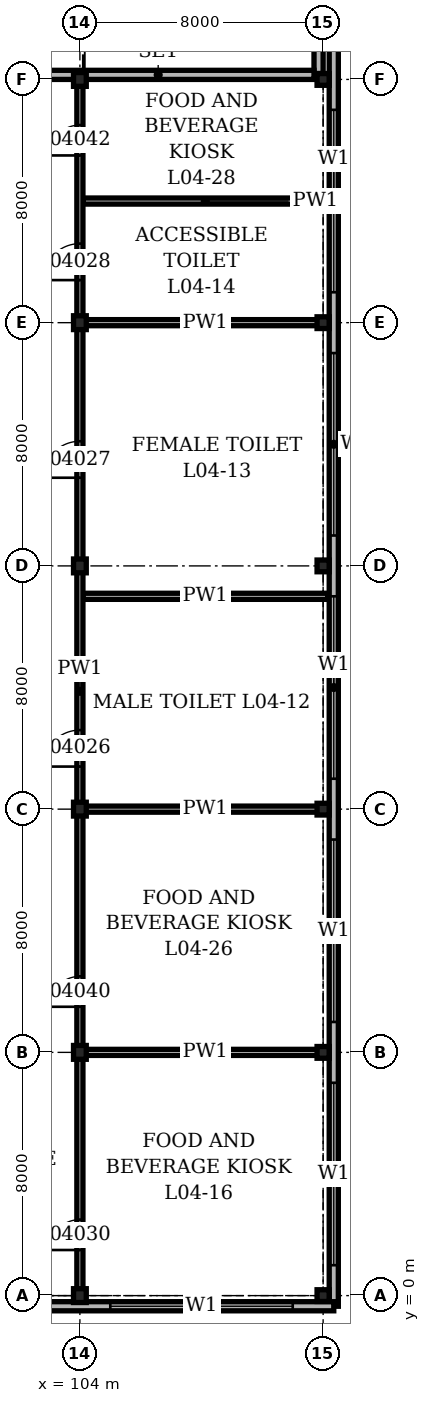
"""IFC4 building model, lengths in metres.
Left out: names, types, materials, properties, quantities, classifications, styles, units other than length and angle.
Written with IfcOpenShell. Run it as: python <this file> out.ifc"""

import sys

from ifc_helpers import new_model, si_unit, direction, frame, frame_2d, origin, origin_2d, place, context, subcontext, project, spatial, rectangle, i_section, extrude, element, fill, save


model = new_model("IFC4")
c1 = context("Model", 3, precision=1e-05, world=origin(), true_north=direction((0.0, 1.0)))
c2 = subcontext(c1, "Body", "Model", "MODEL_VIEW")
j1 = project(units=[si_unit("LENGTHUNIT", "METRE"), si_unit("PLANEANGLEUNIT", "RADIAN")], contexts=[c1])
p1 = place(None, origin())
s1 = spatial("IfcSite", under=j1, at=p1, CompositionType="ELEMENT")
p2 = place(p1, origin())
s2 = spatial("IfcBuilding", under=s1, at=p2, CompositionType="ELEMENT")
p3 = place(p2, frame((0.0, 0.0, 19.9)))
s3 = spatial("IfcBuildingStorey", under=s2, at=p3, CompositionType="ELEMENT", Elevation=19.9)
for number, where, z_axis, x_axis in (
    (1, (104.0, 0.0, 0.0), (0.0, 0.0, 1.0), (1.0, 0.0, 0.0)),
    (2, (104.0, 8.0, 0.0), (0.0, 0.0, 1.0), (1.0, 0.0, 0.0)),
    (3, (104.0, 16.0, 0.0), (0.0, 0.0, 1.0), (1.0, 0.0, 0.0)),
    (4, (104.0, 24.0, 0.0), (0.0, 0.0, 1.0), (1.0, 0.0, 0.0)),
    (5, (104.0, 32.0, 0.0), (0.0, 0.0, 1.0), (1.0, 0.0, 0.0)),
    (6, (104.0, 40.0, 0.0), (0.0, 0.0, 1.0), (1.0, 0.0, 0.0)),
):
    element("IfcColumn", number, at=place(p3, frame(where, z_axis=z_axis, x_axis=x_axis)), inside=s3, PredefinedType="COLUMN", context=c2, shape_type="SweptSolid", body=[
        extrude(i_section(OverallWidth=0.419, OverallDepth=0.455, WebThickness=0.042, FlangeThickness=0.068, at=origin_2d()), origin(), (0.0, 0.0, 1.0), 6.0),
    ])
for number, where, z_axis, x_axis in (
    (7, (112.0, 0.0, 0.0), (0.0, 0.0, 1.0), (1.0, 0.0, 0.0)),
    (8, (112.0, 8.0, 0.0), (0.0, 0.0, 1.0), (1.0, 0.0, 0.0)),
    (9, (112.0, 16.0, 0.0), (0.0, 0.0, 1.0), (1.0, 0.0, 0.0)),
    (10, (112.0, 24.0, 0.0), (0.0, 0.0, 1.0), (1.0, 0.0, 0.0)),
    (11, (112.0, 32.0, 0.0), (0.0, 0.0, 1.0), (1.0, 0.0, 0.0)),
    (12, (112.0, 40.0, 0.0), (0.0, 0.0, 1.0), (1.0, 0.0, 0.0)),
):
    element("IfcColumn", number, at=place(p3, frame(where, z_axis=z_axis, x_axis=x_axis)), inside=s3, PredefinedType="COLUMN", context=c2, shape_type="SweptSolid", body=[
        extrude(i_section(OverallWidth=0.399, OverallDepth=0.386, WebThickness=0.021, FlangeThickness=0.033, at=origin_2d()), origin(), (0.0, 0.0, 1.0), 6.0),
    ])
p4 = place(p3, frame((-0.35, -0.35, 0.0), z_axis=(0.0, 0.0, 1.0), x_axis=(1.0, 0.0, 0.0)))
e13 = element("IfcWall", 13, at=p4, inside=s3, PredefinedType="SOLIDWALL", context=c2, shape_type="SweptSolid", body=[
    extrude(rectangle(XDim=112.7, YDim=0.3, at=frame_2d((56.35, 0.0))), origin(), (0.0, 0.0, 1.0), 6.0),
])
p5 = place(p4, frame((1.35, 0.0, 1.0)))
e14 = element("IfcOpeningElement", 14, at=p5, cuts=e13, PredefinedType="OPENING", context=c2, shape_type="SweptSolid", body=[
    extrude(rectangle(XDim=6.0, YDim=1.5, at=frame_2d((3.0, 0.75))), frame((0.0, 0.16, 0.0), z_axis=(0.0, -1.0, 0.0), x_axis=(1.0, 0.0, 0.0)), (0.0, 0.0, 1.0), 0.32),
])
p6 = place(p4, frame((9.35, 0.0, 1.0)))
e15 = element("IfcOpeningElement", 15, at=p6, cuts=e13, PredefinedType="OPENING", context=c2, shape_type="SweptSolid", body=[
    extrude(rectangle(XDim=6.0, YDim=1.5, at=frame_2d((3.0, 0.75))), frame((0.0, 0.16, 0.0), z_axis=(0.0, -1.0, 0.0), x_axis=(1.0, 0.0, 0.0)), (0.0, 0.0, 1.0), 0.32),
])
p7 = place(p4, frame((17.35, 0.0, 1.0)))
e16 = element("IfcOpeningElement", 16, at=p7, cuts=e13, PredefinedType="OPENING", context=c2, shape_type="SweptSolid", body=[
    extrude(rectangle(XDim=6.0, YDim=1.5, at=frame_2d((3.0, 0.75))), frame((0.0, 0.16, 0.0), z_axis=(0.0, -1.0, 0.0), x_axis=(1.0, 0.0, 0.0)), (0.0, 0.0, 1.0), 0.32),
])
p8 = place(p4, frame((25.35, 0.0, 1.0)))
e17 = element("IfcOpeningElement", 17, at=p8, cuts=e13, PredefinedType="OPENING", context=c2, shape_type="SweptSolid", body=[
    extrude(rectangle(XDim=6.0, YDim=1.5, at=frame_2d((3.0, 0.75))), frame((0.0, 0.16, 0.0), z_axis=(0.0, -1.0, 0.0), x_axis=(1.0, 0.0, 0.0)), (0.0, 0.0, 1.0), 0.32),
])
p9 = place(p4, frame((33.35, 0.0, 1.0)))
e18 = element("IfcOpeningElement", 18, at=p9, cuts=e13, PredefinedType="OPENING", context=c2, shape_type="SweptSolid", body=[
    extrude(rectangle(XDim=6.0, YDim=1.5, at=frame_2d((3.0, 0.75))), frame((0.0, 0.16, 0.0), z_axis=(0.0, -1.0, 0.0), x_axis=(1.0, 0.0, 0.0)), (0.0, 0.0, 1.0), 0.32),
])
p10 = place(p4, frame((41.35, 0.0, 1.0)))
e19 = element("IfcOpeningElement", 19, at=p10, cuts=e13, PredefinedType="OPENING", context=c2, shape_type="SweptSolid", body=[
    extrude(rectangle(XDim=6.0, YDim=1.5, at=frame_2d((3.0, 0.75))), frame((0.0, 0.16, 0.0), z_axis=(0.0, -1.0, 0.0), x_axis=(1.0, 0.0, 0.0)), (0.0, 0.0, 1.0), 0.32),
])
p11 = place(p4, frame((49.35, 0.0, 1.0)))
e20 = element("IfcOpeningElement", 20, at=p11, cuts=e13, PredefinedType="OPENING", context=c2, shape_type="SweptSolid", body=[
    extrude(rectangle(XDim=6.0, YDim=1.5, at=frame_2d((3.0, 0.75))), frame((0.0, 0.16, 0.0), z_axis=(0.0, -1.0, 0.0), x_axis=(1.0, 0.0, 0.0)), (0.0, 0.0, 1.0), 0.32),
])
p12 = place(p4, frame((57.35, 0.0, 1.0)))
e21 = element("IfcOpeningElement", 21, at=p12, cuts=e13, PredefinedType="OPENING", context=c2, shape_type="SweptSolid", body=[
    extrude(rectangle(XDim=6.0, YDim=1.5, at=frame_2d((3.0, 0.75))), frame((0.0, 0.16, 0.0), z_axis=(0.0, -1.0, 0.0), x_axis=(1.0, 0.0, 0.0)), (0.0, 0.0, 1.0), 0.32),
])
p13 = place(p4, frame((65.35, 0.0, 1.0)))
e22 = element("IfcOpeningElement", 22, at=p13, cuts=e13, PredefinedType="OPENING", context=c2, shape_type="SweptSolid", body=[
    extrude(rectangle(XDim=6.0, YDim=1.5, at=frame_2d((3.0, 0.75))), frame((0.0, 0.16, 0.0), z_axis=(0.0, -1.0, 0.0), x_axis=(1.0, 0.0, 0.0)), (0.0, 0.0, 1.0), 0.32),
])
p14 = place(p4, frame((73.35, 0.0, 1.0)))
e23 = element("IfcOpeningElement", 23, at=p14, cuts=e13, PredefinedType="OPENING", context=c2, shape_type="SweptSolid", body=[
    extrude(rectangle(XDim=6.0, YDim=1.5, at=frame_2d((3.0, 0.75))), frame((0.0, 0.16, 0.0), z_axis=(0.0, -1.0, 0.0), x_axis=(1.0, 0.0, 0.0)), (0.0, 0.0, 1.0), 0.32),
])
p15 = place(p4, frame((81.35, 0.0, 1.0)))
e24 = element("IfcOpeningElement", 24, at=p15, cuts=e13, PredefinedType="OPENING", context=c2, shape_type="SweptSolid", body=[
    extrude(rectangle(XDim=6.0, YDim=1.5, at=frame_2d((3.0, 0.75))), frame((0.0, 0.16, 0.0), z_axis=(0.0, -1.0, 0.0), x_axis=(1.0, 0.0, 0.0)), (0.0, 0.0, 1.0), 0.32),
])
p16 = place(p4, frame((89.35, 0.0, 1.0)))
e25 = element("IfcOpeningElement", 25, at=p16, cuts=e13, PredefinedType="OPENING", context=c2, shape_type="SweptSolid", body=[
    extrude(rectangle(XDim=6.0, YDim=1.5, at=frame_2d((3.0, 0.75))), frame((0.0, 0.16, 0.0), z_axis=(0.0, -1.0, 0.0), x_axis=(1.0, 0.0, 0.0)), (0.0, 0.0, 1.0), 0.32),
])
p17 = place(p4, frame((97.35, 0.0, 1.0)))
e26 = element("IfcOpeningElement", 26, at=p17, cuts=e13, PredefinedType="OPENING", context=c2, shape_type="SweptSolid", body=[
    extrude(rectangle(XDim=6.0, YDim=1.5, at=frame_2d((3.0, 0.75))), frame((0.0, 0.16, 0.0), z_axis=(0.0, -1.0, 0.0), x_axis=(1.0, 0.0, 0.0)), (0.0, 0.0, 1.0), 0.32),
])
p18 = place(p4, frame((105.35, 0.0, 1.0)))
e27 = element("IfcOpeningElement", 27, at=p18, cuts=e13, PredefinedType="OPENING", context=c2, shape_type="SweptSolid", body=[
    extrude(rectangle(XDim=6.0, YDim=1.5, at=frame_2d((3.0, 0.75))), frame((0.0, 0.16, 0.0), z_axis=(0.0, -1.0, 0.0), x_axis=(1.0, 0.0, 0.0)), (0.0, 0.0, 1.0), 0.32),
])
p19 = place(p3, frame((112.35, -0.35, 0.0), z_axis=(0.0, 0.0, 1.0), x_axis=(0.0, 1.0, 0.0)))
e28 = element("IfcWall", 28, at=p19, inside=s3, PredefinedType="SOLIDWALL", context=c2, shape_type="SweptSolid", body=[
    extrude(rectangle(XDim=112.7, YDim=0.3, at=frame_2d((56.35, 0.0))), origin(), (0.0, 0.0, 1.0), 6.0),
])
p20 = place(p19, frame((1.35, 0.0, 1.0)))
e29 = element("IfcOpeningElement", 29, at=p20, cuts=e28, PredefinedType="OPENING", context=c2, shape_type="SweptSolid", body=[
    extrude(rectangle(XDim=6.0, YDim=1.5, at=frame_2d((3.0, 0.75))), frame((0.0, 0.16, 0.0), z_axis=(0.0, -1.0, 0.0), x_axis=(1.0, 0.0, 0.0)), (0.0, 0.0, 1.0), 0.32),
])
p21 = place(p19, frame((9.35, 0.0, 1.0)))
e30 = element("IfcOpeningElement", 30, at=p21, cuts=e28, PredefinedType="OPENING", context=c2, shape_type="SweptSolid", body=[
    extrude(rectangle(XDim=6.0, YDim=1.5, at=frame_2d((3.0, 0.75))), frame((0.0, 0.16, 0.0), z_axis=(0.0, -1.0, 0.0), x_axis=(1.0, 0.0, 0.0)), (0.0, 0.0, 1.0), 0.32),
])
p22 = place(p19, frame((17.35, 0.0, 1.0)))
e31 = element("IfcOpeningElement", 31, at=p22, cuts=e28, PredefinedType="OPENING", context=c2, shape_type="SweptSolid", body=[
    extrude(rectangle(XDim=6.0, YDim=1.5, at=frame_2d((3.0, 0.75))), frame((0.0, 0.16, 0.0), z_axis=(0.0, -1.0, 0.0), x_axis=(1.0, 0.0, 0.0)), (0.0, 0.0, 1.0), 0.32),
])
p23 = place(p19, frame((25.35, 0.0, 1.0)))
e32 = element("IfcOpeningElement", 32, at=p23, cuts=e28, PredefinedType="OPENING", context=c2, shape_type="SweptSolid", body=[
    extrude(rectangle(XDim=6.0, YDim=1.5, at=frame_2d((3.0, 0.75))), frame((0.0, 0.16, 0.0), z_axis=(0.0, -1.0, 0.0), x_axis=(1.0, 0.0, 0.0)), (0.0, 0.0, 1.0), 0.32),
])
p24 = place(p19, frame((33.35, 0.0, 1.0)))
e33 = element("IfcOpeningElement", 33, at=p24, cuts=e28, PredefinedType="OPENING", context=c2, shape_type="SweptSolid", body=[
    extrude(rectangle(XDim=6.0, YDim=1.5, at=frame_2d((3.0, 0.75))), frame((0.0, 0.16, 0.0), z_axis=(0.0, -1.0, 0.0), x_axis=(1.0, 0.0, 0.0)), (0.0, 0.0, 1.0), 0.32),
])
p25 = place(p19, frame((41.35, 0.0, 1.0)))
e34 = element("IfcOpeningElement", 34, at=p25, cuts=e28, PredefinedType="OPENING", context=c2, shape_type="SweptSolid", body=[
    extrude(rectangle(XDim=6.0, YDim=1.5, at=frame_2d((3.0, 0.75))), frame((0.0, 0.16, 0.0), z_axis=(0.0, -1.0, 0.0), x_axis=(1.0, 0.0, 0.0)), (0.0, 0.0, 1.0), 0.32),
])
p26 = place(p19, frame((49.35, 0.0, 1.0)))
e35 = element("IfcOpeningElement", 35, at=p26, cuts=e28, PredefinedType="OPENING", context=c2, shape_type="SweptSolid", body=[
    extrude(rectangle(XDim=6.0, YDim=1.5, at=frame_2d((3.0, 0.75))), frame((0.0, 0.16, 0.0), z_axis=(0.0, -1.0, 0.0), x_axis=(1.0, 0.0, 0.0)), (0.0, 0.0, 1.0), 0.32),
])
p27 = place(p19, frame((57.35, 0.0, 1.0)))
e36 = element("IfcOpeningElement", 36, at=p27, cuts=e28, PredefinedType="OPENING", context=c2, shape_type="SweptSolid", body=[
    extrude(rectangle(XDim=6.0, YDim=1.5, at=frame_2d((3.0, 0.75))), frame((0.0, 0.16, 0.0), z_axis=(0.0, -1.0, 0.0), x_axis=(1.0, 0.0, 0.0)), (0.0, 0.0, 1.0), 0.32),
])
p28 = place(p19, frame((65.35, 0.0, 1.0)))
e37 = element("IfcOpeningElement", 37, at=p28, cuts=e28, PredefinedType="OPENING", context=c2, shape_type="SweptSolid", body=[
    extrude(rectangle(XDim=6.0, YDim=1.5, at=frame_2d((3.0, 0.75))), frame((0.0, 0.16, 0.0), z_axis=(0.0, -1.0, 0.0), x_axis=(1.0, 0.0, 0.0)), (0.0, 0.0, 1.0), 0.32),
])
p29 = place(p19, frame((73.35, 0.0, 1.0)))
e38 = element("IfcOpeningElement", 38, at=p29, cuts=e28, PredefinedType="OPENING", context=c2, shape_type="SweptSolid", body=[
    extrude(rectangle(XDim=6.0, YDim=1.5, at=frame_2d((3.0, 0.75))), frame((0.0, 0.16, 0.0), z_axis=(0.0, -1.0, 0.0), x_axis=(1.0, 0.0, 0.0)), (0.0, 0.0, 1.0), 0.32),
])
p30 = place(p19, frame((81.35, 0.0, 1.0)))
e39 = element("IfcOpeningElement", 39, at=p30, cuts=e28, PredefinedType="OPENING", context=c2, shape_type="SweptSolid", body=[
    extrude(rectangle(XDim=6.0, YDim=1.5, at=frame_2d((3.0, 0.75))), frame((0.0, 0.16, 0.0), z_axis=(0.0, -1.0, 0.0), x_axis=(1.0, 0.0, 0.0)), (0.0, 0.0, 1.0), 0.32),
])
p31 = place(p19, frame((89.35, 0.0, 1.0)))
e40 = element("IfcOpeningElement", 40, at=p31, cuts=e28, PredefinedType="OPENING", context=c2, shape_type="SweptSolid", body=[
    extrude(rectangle(XDim=6.0, YDim=1.5, at=frame_2d((3.0, 0.75))), frame((0.0, 0.16, 0.0), z_axis=(0.0, -1.0, 0.0), x_axis=(1.0, 0.0, 0.0)), (0.0, 0.0, 1.0), 0.32),
])
p32 = place(p19, frame((97.35, 0.0, 1.0)))
e41 = element("IfcOpeningElement", 41, at=p32, cuts=e28, PredefinedType="OPENING", context=c2, shape_type="SweptSolid", body=[
    extrude(rectangle(XDim=6.0, YDim=1.5, at=frame_2d((3.0, 0.75))), frame((0.0, 0.16, 0.0), z_axis=(0.0, -1.0, 0.0), x_axis=(1.0, 0.0, 0.0)), (0.0, 0.0, 1.0), 0.32),
])
p33 = place(p19, frame((105.35, 0.0, 1.0)))
e42 = element("IfcOpeningElement", 42, at=p33, cuts=e28, PredefinedType="OPENING", context=c2, shape_type="SweptSolid", body=[
    extrude(rectangle(XDim=6.0, YDim=1.5, at=frame_2d((3.0, 0.75))), frame((0.0, 0.16, 0.0), z_axis=(0.0, -1.0, 0.0), x_axis=(1.0, 0.0, 0.0)), (0.0, 0.0, 1.0), 0.32),
])
p34 = place(p3, frame((111.85, 40.193, 0.0), z_axis=(0.0, 0.0, 1.0), x_axis=(0.0, 1.0, 0.0)))
e43 = element("IfcWall", 43, at=p34, inside=s3, PredefinedType="SOLIDWALL", context=c2, shape_type="SweptSolid", body=[
    extrude(rectangle(XDim=7.614, YDim=0.3, at=frame_2d((3.807, 0.0))), origin(), (0.0, 0.0, 1.0), 5.75),
])
p35 = place(p3, frame((101.45, 40.15, 0.0), z_axis=(0.0, 0.0, 1.0), x_axis=(1.0, 0.0, 0.0)))
e44 = element("IfcWall", 44, at=p35, inside=s3, PredefinedType="SOLIDWALL", context=c2, shape_type="SweptSolid", body=[
    extrude(rectangle(XDim=10.25, YDim=0.3, at=frame_2d((5.125, 0.0))), origin(), (0.0, 0.0, 1.0), 5.75),
])
for number, where, z_axis, x_axis in (
    (45, (104.1, 8.0, 0.0), (0.0, 0.0, 1.0), (1.0, 0.0, 0.0)),
    (46, (104.1, 16.0, 0.0), (0.0, 0.0, 1.0), (1.0, 0.0, 0.0)),
):
    element("IfcWall", number, at=place(p3, frame(where, z_axis=z_axis, x_axis=x_axis)), inside=s3, PredefinedType="PARTITIONING", context=c2, shape_type="SweptSolid", body=[
        extrude(rectangle(XDim=8.05, YDim=0.2, at=frame_2d((4.025, 0.0))), origin(), (0.0, 0.0, 1.0), 4.978),
    ])
p36 = place(p3, frame((104.1, 23.0, 0.0), z_axis=(0.0, 0.0, 1.0), x_axis=(1.0, 0.0, 0.0)))
e47 = element("IfcWall", 47, at=p36, inside=s3, PredefinedType="PARTITIONING", context=c2, shape_type="SweptSolid", body=[
    extrude(rectangle(XDim=8.05, YDim=0.2, at=frame_2d((4.025, 0.0))), origin(), (0.0, 0.0, 1.0), 5.75),
])
p37 = place(p3, frame((104.1, 32.0, 0.0), z_axis=(0.0, 0.0, 1.0), x_axis=(1.0, 0.0, 0.0)))
e48 = element("IfcWall", 48, at=p37, inside=s3, PredefinedType="PARTITIONING", context=c2, shape_type="SweptSolid", body=[
    extrude(rectangle(XDim=8.05, YDim=0.2, at=frame_2d((4.025, 0.0))), origin(), (0.0, 0.0, 1.0), 4.978),
])
p38 = place(p3, frame((104.1, 36.0, 0.0), z_axis=(0.0, 0.0, 1.0), x_axis=(1.0, 0.0, 0.0)))
e49 = element("IfcWall", 49, at=p38, inside=s3, PredefinedType="PARTITIONING", context=c2, shape_type="SweptSolid", body=[
    extrude(rectangle(XDim=8.05, YDim=0.2, at=frame_2d((4.025, 0.0))), origin(), (0.0, 0.0, 1.0), 5.75),
])
p39 = place(p3, frame((104.0, -0.15, 0.0), z_axis=(0.0, 0.0, 1.0), x_axis=(0.0, 1.0, 0.0)))
e50 = element("IfcWall", 50, at=p39, inside=s3, PredefinedType="PARTITIONING", context=c2, shape_type="SweptSolid", body=[
    extrude(rectangle(XDim=40.05, YDim=0.2, at=frame_2d((20.025, 0.0))), origin(), (0.0, 0.0, 1.0), 4.978),
])
p40 = place(p39, frame((17.55, 0.0, 0.0)))
e51 = element("IfcOpeningElement", 51, at=p40, cuts=e50, PredefinedType="OPENING", context=c2, shape_type="SweptSolid", body=[
    extrude(rectangle(XDim=1.2, YDim=2.1, at=frame_2d((0.6, 1.05))), frame((0.0, 0.11, 0.0), z_axis=(0.0, -1.0, 0.0), x_axis=(1.0, 0.0, 0.0)), (0.0, 0.0, 1.0), 0.22),
])
p41 = place(p39, frame((27.05, 0.0, 0.0)))
e52 = element("IfcOpeningElement", 52, at=p41, cuts=e50, PredefinedType="OPENING", context=c2, shape_type="SweptSolid", body=[
    extrude(rectangle(XDim=1.2, YDim=2.1, at=frame_2d((0.6, 1.05))), frame((0.0, 0.11, 0.0), z_axis=(0.0, -1.0, 0.0), x_axis=(1.0, 0.0, 0.0)), (0.0, 0.0, 1.0), 0.22),
])
p42 = place(p39, frame((33.55, 0.0, 0.0)))
e53 = element("IfcOpeningElement", 53, at=p42, cuts=e50, PredefinedType="OPENING", context=c2, shape_type="SweptSolid", body=[
    extrude(rectangle(XDim=1.2, YDim=2.1, at=frame_2d((0.6, 1.05))), frame((0.0, 0.11, 0.0), z_axis=(0.0, -1.0, 0.0), x_axis=(1.0, 0.0, 0.0)), (0.0, 0.0, 1.0), 0.22),
])
p43 = place(p39, frame((1.65, 0.0, 0.0)))
e54 = element("IfcOpeningElement", 54, at=p43, cuts=e50, PredefinedType="OPENING", context=c2, shape_type="SweptSolid", body=[
    extrude(rectangle(XDim=1.0, YDim=2.1, at=frame_2d((0.5, 1.05))), frame((0.0, 0.11, 0.0), z_axis=(0.0, -1.0, 0.0), x_axis=(1.0, 0.0, 0.0)), (0.0, 0.0, 1.0), 0.22),
])
p44 = place(p39, frame((9.65, 0.0, 0.0)))
e55 = element("IfcOpeningElement", 55, at=p44, cuts=e50, PredefinedType="OPENING", context=c2, shape_type="SweptSolid", body=[
    extrude(rectangle(XDim=1.0, YDim=2.1, at=frame_2d((0.5, 1.05))), frame((0.0, 0.11, 0.0), z_axis=(0.0, -1.0, 0.0), x_axis=(1.0, 0.0, 0.0)), (0.0, 0.0, 1.0), 0.22),
])
p45 = place(p39, frame((37.65, 0.0, 0.0)))
e56 = element("IfcOpeningElement", 56, at=p45, cuts=e50, PredefinedType="OPENING", context=c2, shape_type="SweptSolid", body=[
    extrude(rectangle(XDim=1.0, YDim=2.1, at=frame_2d((0.5, 1.05))), frame((0.0, 0.11, 0.0), z_axis=(0.0, -1.0, 0.0), x_axis=(1.0, 0.0, 0.0)), (0.0, 0.0, 1.0), 0.22),
])
p46 = place(p18, origin())
e57 = element("IfcWindow", 57, at=p46, inside=s3, PartitioningType="SINGLE_PANEL", PredefinedType="WINDOW", context=c2, shape_type="SweptSolid", body=[
    extrude(rectangle(XDim=6.0, YDim=1.5, at=frame_2d((3.0, 0.75))), frame((0.0, 0.03, 0.0), z_axis=(0.0, -1.0, 0.0), x_axis=(1.0, 0.0, 0.0)), (0.0, 0.0, 1.0), 0.06),
])
fill(e27, e57)
p47 = place(p20, origin())
e58 = element("IfcWindow", 58, at=p47, inside=s3, PartitioningType="SINGLE_PANEL", PredefinedType="WINDOW", context=c2, shape_type="SweptSolid", body=[
    extrude(rectangle(XDim=6.0, YDim=1.5, at=frame_2d((3.0, 0.75))), frame((0.0, 0.03, 0.0), z_axis=(0.0, -1.0, 0.0), x_axis=(1.0, 0.0, 0.0)), (0.0, 0.0, 1.0), 0.06),
])
fill(e29, e58)
p48 = place(p21, origin())
e59 = element("IfcWindow", 59, at=p48, inside=s3, PartitioningType="SINGLE_PANEL", PredefinedType="WINDOW", context=c2, shape_type="SweptSolid", body=[
    extrude(rectangle(XDim=6.0, YDim=1.5, at=frame_2d((3.0, 0.75))), frame((0.0, 0.03, 0.0), z_axis=(0.0, -1.0, 0.0), x_axis=(1.0, 0.0, 0.0)), (0.0, 0.0, 1.0), 0.06),
])
fill(e30, e59)
p49 = place(p22, origin())
e60 = element("IfcWindow", 60, at=p49, inside=s3, PartitioningType="SINGLE_PANEL", PredefinedType="WINDOW", context=c2, shape_type="SweptSolid", body=[
    extrude(rectangle(XDim=6.0, YDim=1.5, at=frame_2d((3.0, 0.75))), frame((0.0, 0.03, 0.0), z_axis=(0.0, -1.0, 0.0), x_axis=(1.0, 0.0, 0.0)), (0.0, 0.0, 1.0), 0.06),
])
fill(e31, e60)
p50 = place(p23, origin())
e61 = element("IfcWindow", 61, at=p50, inside=s3, PartitioningType="SINGLE_PANEL", PredefinedType="WINDOW", context=c2, shape_type="SweptSolid", body=[
    extrude(rectangle(XDim=6.0, YDim=1.5, at=frame_2d((3.0, 0.75))), frame((0.0, 0.03, 0.0), z_axis=(0.0, -1.0, 0.0), x_axis=(1.0, 0.0, 0.0)), (0.0, 0.0, 1.0), 0.06),
])
fill(e32, e61)
p51 = place(p24, origin())
e62 = element("IfcWindow", 62, at=p51, inside=s3, PartitioningType="SINGLE_PANEL", PredefinedType="WINDOW", context=c2, shape_type="SweptSolid", body=[
    extrude(rectangle(XDim=6.0, YDim=1.5, at=frame_2d((3.0, 0.75))), frame((0.0, 0.03, 0.0), z_axis=(0.0, -1.0, 0.0), x_axis=(1.0, 0.0, 0.0)), (0.0, 0.0, 1.0), 0.06),
])
fill(e33, e62)
p52 = place(p40, origin())
e63 = element("IfcDoor", 63, at=p52, inside=s3, OperationType="SINGLE_SWING_RIGHT", PredefinedType="DOOR", context=c2, shape_type="SweptSolid", body=[
    extrude(rectangle(XDim=1.2, YDim=2.1, at=frame_2d((0.6, 1.05))), frame((0.0, 0.1, 0.0), z_axis=(0.0, -1.0, 0.0), x_axis=(1.0, 0.0, 0.0)), (0.0, 0.0, 1.0), 0.199),
])
fill(e51, e63)
p53 = place(p41, origin())
e64 = element("IfcDoor", 64, at=p53, inside=s3, OperationType="SINGLE_SWING_RIGHT", PredefinedType="DOOR", context=c2, shape_type="SweptSolid", body=[
    extrude(rectangle(XDim=1.2, YDim=2.1, at=frame_2d((0.6, 1.05))), frame((0.0, 0.1, 0.0), z_axis=(0.0, -1.0, 0.0), x_axis=(1.0, 0.0, 0.0)), (0.0, 0.0, 1.0), 0.199),
])
fill(e52, e64)
p54 = place(p42, origin())
e65 = element("IfcDoor", 65, at=p54, inside=s3, OperationType="SINGLE_SWING_RIGHT", PredefinedType="DOOR", context=c2, shape_type="SweptSolid", body=[
    extrude(rectangle(XDim=1.2, YDim=2.1, at=frame_2d((0.6, 1.05))), frame((0.0, 0.1, 0.0), z_axis=(0.0, -1.0, 0.0), x_axis=(1.0, 0.0, 0.0)), (0.0, 0.0, 1.0), 0.199),
])
fill(e53, e65)
p55 = place(p43, origin())
e66 = element("IfcDoor", 66, at=p55, inside=s3, OperationType="SINGLE_SWING_LEFT", PredefinedType="DOOR", context=c2, shape_type="SweptSolid", body=[
    extrude(rectangle(XDim=1.0, YDim=2.1, at=frame_2d((0.5, 1.05))), frame((0.0, 0.1, 0.0), z_axis=(0.0, -1.0, 0.0), x_axis=(1.0, 0.0, 0.0)), (0.0, 0.0, 1.0), 0.199),
])
fill(e54, e66)
p56 = place(p44, origin())
e67 = element("IfcDoor", 67, at=p56, inside=s3, OperationType="SINGLE_SWING_LEFT", PredefinedType="DOOR", context=c2, shape_type="SweptSolid", body=[
    extrude(rectangle(XDim=1.0, YDim=2.1, at=frame_2d((0.5, 1.05))), frame((0.0, 0.1, 0.0), z_axis=(0.0, -1.0, 0.0), x_axis=(1.0, 0.0, 0.0)), (0.0, 0.0, 1.0), 0.199),
])
fill(e55, e67)
p57 = place(p45, origin())
e68 = element("IfcDoor", 68, at=p57, inside=s3, OperationType="SINGLE_SWING_LEFT", PredefinedType="DOOR", context=c2, shape_type="SweptSolid", body=[
    extrude(rectangle(XDim=1.0, YDim=2.1, at=frame_2d((0.5, 1.05))), frame((0.0, 0.1, 0.0), z_axis=(0.0, -1.0, 0.0), x_axis=(1.0, 0.0, 0.0)), (0.0, 0.0, 1.0), 0.199),
])
fill(e56, e68)
save(model, sys.argv[1])
